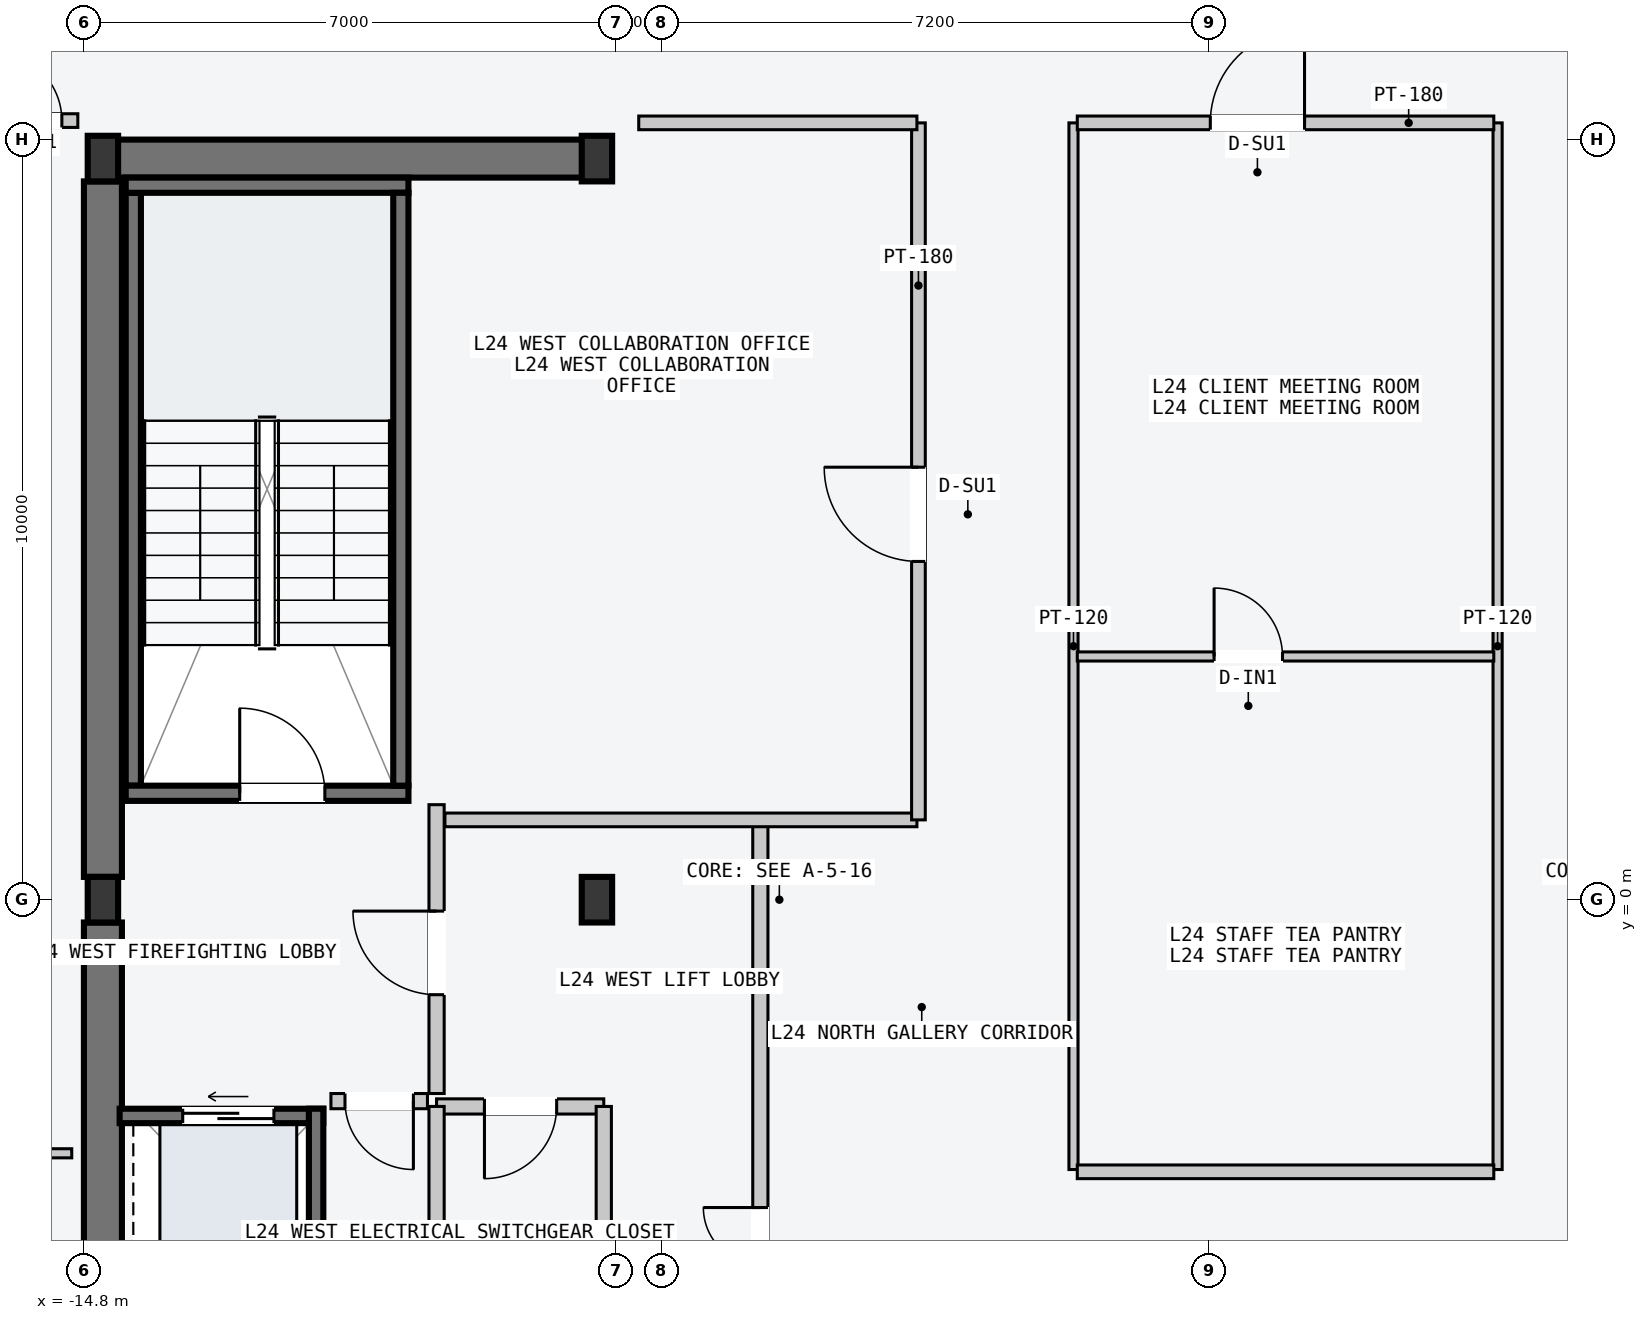
"""IFC4 building model, lengths in metres.
Left out: names, types, materials, properties, quantities, classifications, styles, units other than length and angle.
Written with IfcOpenShell. Run it as: python <this file> out.ifc"""

import sys

from ifc_helpers import new_model, si_unit, direction, frame, frame_2d, origin, origin_2d, place, context, subcontext, project, spatial, rectangle, i_section, extrude, element, fill, save


model = new_model("IFC4")
c1 = context("Model", 3, precision=1e-05, world=origin(), true_north=direction((0.0, 1.0)))
c2 = subcontext(c1, "Body", "Model", "MODEL_VIEW")
j1 = project(units=[si_unit("LENGTHUNIT", "METRE"), si_unit("PLANEANGLEUNIT", "RADIAN")], contexts=[c1])
p1 = place(None, origin())
s1 = spatial("IfcSite", under=j1, at=p1, CompositionType="ELEMENT")
p2 = place(p1, origin())
s2 = spatial("IfcBuilding", under=s1, at=p2, CompositionType="ELEMENT")
p3 = place(p2, frame((0.0, 0.0, 95.4)))
s3 = spatial("IfcBuildingStorey", under=s2, at=p3, CompositionType="ELEMENT", Elevation=95.4)
p4 = place(p3, frame((-14.53, 9.75, -0.2), z_axis=(0.0, 0.0, 1.0), x_axis=(1.0, 0.0, 0.0)))
e1 = element("IfcWall", 1, at=p4, inside=s3, PredefinedType="SHEAR", context=c2, shape_type="SweptSolid", body=[
    extrude(rectangle(XDim=6.46, YDim=0.5, at=frame_2d((3.23, 0.0))), origin(), (0.0, 0.0, 1.0), 3.6),
])
for number, where, z_axis, x_axis in (
    (2, (-14.55, -9.45, -0.2), (0.0, 0.0, 1.0), (0.0, 1.0, 0.0)),
    (3, (-14.55, 0.3, -0.2), (0.0, 0.0, 1.0), (0.0, 1.0, 0.0)),
):
    element("IfcWall", number, at=place(p3, frame(where, z_axis=z_axis, x_axis=x_axis)), inside=s3, PredefinedType="SHEAR", context=c2, shape_type="SweptSolid", body=[
        extrude(rectangle(XDim=9.15, YDim=0.5, at=frame_2d((4.575, 0.0))), origin(), (0.0, 0.0, 1.0), 3.6),
    ])
p5 = place(p3, frame((-14.15, 1.5, -0.2), z_axis=(0.0, 0.0, 1.0), x_axis=(0.0, 1.0, 0.0)))
e4 = element("IfcWall", 4, at=p5, inside=s3, PredefinedType="SOLIDWALL", context=c2, shape_type="SweptSolid", body=[
    extrude(rectangle(XDim=7.8, YDim=0.2, at=frame_2d((3.9, 0.0))), origin(), (0.0, 0.0, 1.0), 3.6),
])
p6 = place(p3, frame((-14.25, 1.4, -0.2), z_axis=(0.0, 0.0, 1.0), x_axis=(1.0, 0.0, 0.0)))
e5 = element("IfcWall", 5, at=p6, inside=s3, PredefinedType="SOLIDWALL", context=c2, shape_type="SweptSolid", body=[
    extrude(rectangle(XDim=3.72, YDim=0.2, at=frame_2d((1.86, 0.0))), origin(), (0.0, 0.0, 1.0), 3.6),
])
p7 = place(p6, frame((1.5, 0.0, 0.2)))
e6 = element("IfcOpeningElement", 6, at=p7, cuts=e5, PredefinedType="OPENING", context=c2, shape_type="SweptSolid", body=[
    extrude(rectangle(XDim=1.12, YDim=2.18, at=frame_2d((0.56, 1.09))), frame((0.0, 0.11, 0.0), z_axis=(0.0, -1.0, 0.0), x_axis=(1.0, 0.0, 0.0)), (0.0, 0.0, 1.0), 0.22),
])
p8 = place(p3, frame((-14.25, 9.4, -0.2), z_axis=(0.0, 0.0, 1.0), x_axis=(1.0, 0.0, 0.0)))
e7 = element("IfcWall", 7, at=p8, inside=s3, PredefinedType="SOLIDWALL", context=c2, shape_type="SweptSolid", body=[
    extrude(rectangle(XDim=3.72, YDim=0.2, at=frame_2d((1.86, 0.0))), origin(), (0.0, 0.0, 1.0), 3.6),
])
p9 = place(p3, frame((-10.63, 1.5, -0.2), z_axis=(0.0, 0.0, 1.0), x_axis=(0.0, 1.0, 0.0)))
e8 = element("IfcWall", 8, at=p9, inside=s3, PredefinedType="SOLIDWALL", context=c2, shape_type="SweptSolid", body=[
    extrude(rectangle(XDim=7.8, YDim=0.2, at=frame_2d((3.9, 0.0))), origin(), (0.0, 0.0, 1.0), 3.6),
])
for number, where, z_axis, x_axis in (
    (9, (-14.55, 0.0, 0.0), (0.0, 0.0, 1.0), (1.0, 0.0, 0.0)),
    (10, (-14.55, 9.75, 0.0), (0.0, 0.0, 1.0), (1.0, 0.0, 0.0)),
    (11, (-8.05, 0.0, 0.0), (0.0, 0.0, 1.0), (1.0, 0.0, 0.0)),
    (12, (-8.05, 9.75, 0.0), (0.0, 0.0, 1.0), (1.0, 0.0, 0.0)),
):
    element("IfcColumn", number, at=place(p3, frame(where, z_axis=z_axis, x_axis=x_axis)), inside=s3, PredefinedType="COLUMN", context=c2, shape_type="SweptSolid", body=[
        extrude(i_section(OverallWidth=0.4, OverallDepth=0.6, WebThickness=0.022, FlangeThickness=0.036, at=origin_2d()), origin(), (0.0, 0.0, 1.0), 3.6),
    ])
p10 = place(p3, frame((-14.33, -2.845, -0.2), z_axis=(0.0, 0.0, 1.0), x_axis=(1.0, 0.0, 0.0)))
e13 = element("IfcWall", 13, at=p10, inside=s3, PredefinedType="SOLIDWALL", context=c2, shape_type="SweptSolid", body=[
    extrude(rectangle(XDim=2.68, YDim=0.19, at=frame_2d((1.34, 0.0))), origin(), (0.0, 0.0, 1.0), 3.6),
])
p11 = place(p10, frame((0.83, 0.0, 0.2)))
e14 = element("IfcOpeningElement", 14, at=p11, cuts=e13, PredefinedType="OPENING", context=c2, shape_type="SweptSolid", body=[
    extrude(rectangle(XDim=1.2, YDim=2.2, at=frame_2d((0.6, 1.1))), frame((0.0, 0.105, 0.0), z_axis=(0.0, -1.0, 0.0), x_axis=(1.0, 0.0, 0.0)), (0.0, 0.0, 1.0), 0.21),
])
p12 = place(p3, frame((-11.745, -5.35, -0.2), z_axis=(0.0, 0.0, 1.0), x_axis=(0.0, 1.0, 0.0)))
e15 = element("IfcWall", 15, at=p12, inside=s3, PredefinedType="SOLIDWALL", context=c2, shape_type="SweptSolid", body=[
    extrude(rectangle(XDim=2.6, YDim=0.19, at=frame_2d((1.3, 0.0))), origin(), (0.0, 0.0, 1.0), 3.6),
])
p13 = place(p3, frame((-5.9, -9.45, 0.0), z_axis=(0.0, 0.0, 1.0), x_axis=(0.0, 1.0, 0.0)))
e16 = element("IfcWall", 16, at=p13, inside=s3, PredefinedType="PARTITIONING", context=c2, shape_type="SweptSolid", body=[
    extrude(rectangle(XDim=10.5, YDim=0.2, at=frame_2d((5.25, 0.0))), origin(), (0.0, 0.0, 1.0), 3.4),
])
p14 = place(p13, frame((3.9, 0.0, 0.0)))
e17 = element("IfcOpeningElement", 17, at=p14, cuts=e16, PredefinedType="OPENING", context=c2, shape_type="SweptSolid", body=[
    extrude(rectangle(XDim=1.5, YDim=2.2, at=frame_2d((0.75, 1.1))), frame((0.0, 0.11, 0.0), z_axis=(0.0, -1.0, 0.0), x_axis=(1.0, 0.0, 0.0)), (0.0, 0.0, 1.0), 0.22),
])
p15 = place(p3, frame((-10.16, -2.55, 0.0), z_axis=(0.0, 0.0, 1.0), x_axis=(0.0, 1.0, 0.0)))
e18 = element("IfcWall", 18, at=p15, inside=s3, PredefinedType="PARTITIONING", context=c2, shape_type="SweptSolid", body=[
    extrude(rectangle(XDim=3.8, YDim=0.2, at=frame_2d((1.9, 0.0))), origin(), (0.0, 0.0, 1.0), 3.4),
])
p16 = place(p15, frame((1.3, 0.0, 0.0)))
e19 = element("IfcOpeningElement", 19, at=p16, cuts=e18, PredefinedType="OPENING", context=c2, shape_type="SweptSolid", body=[
    extrude(rectangle(XDim=1.1, YDim=2.15, at=frame_2d((0.55, 1.075))), frame((0.0, 0.11, 0.0), z_axis=(0.0, -1.0, 0.0), x_axis=(1.0, 0.0, 0.0)), (0.0, 0.0, 1.0), 0.22),
])
p17 = place(p3, frame((-10.28, -2.65, 0.0), z_axis=(0.0, 0.0, 1.0), x_axis=(-1.0, 0.0, 0.0)))
e20 = element("IfcWall", 20, at=p17, inside=s3, PredefinedType="PARTITIONING", context=c2, shape_type="SweptSolid", body=[
    extrude(rectangle(XDim=1.27, YDim=0.2, at=frame_2d((0.635, 0.0))), origin(), (0.0, 0.0, 1.0), 3.4),
])
p18 = place(p17, frame((0.185, 0.0, 0.0)))
e21 = element("IfcOpeningElement", 21, at=p18, cuts=e20, PredefinedType="OPENING", context=c2, shape_type="SweptSolid", body=[
    extrude(rectangle(XDim=0.9, YDim=2.15, at=frame_2d((0.45, 1.075))), frame((0.0, 0.11, 0.0), z_axis=(0.0, -1.0, 0.0), x_axis=(1.0, 0.0, 0.0)), (0.0, 0.0, 1.0), 0.22),
])
p19 = place(p3, frame((-7.96, -2.72, 0.0), z_axis=(0.0, 0.0, 1.0), x_axis=(-1.0, 0.0, 0.0)))
e22 = element("IfcWall", 22, at=p19, inside=s3, PredefinedType="PARTITIONING", context=c2, shape_type="SweptSolid", body=[
    extrude(rectangle(XDim=2.2, YDim=0.2, at=frame_2d((1.1, 0.0))), origin(), (0.0, 0.0, 1.0), 3.4),
])
p20 = place(p19, frame((0.62, 0.0, 0.0)))
e23 = element("IfcOpeningElement", 23, at=p20, cuts=e22, PredefinedType="OPENING", context=c2, shape_type="SweptSolid", body=[
    extrude(rectangle(XDim=0.95, YDim=2.1, at=frame_2d((0.475, 1.05))), frame((0.0, 0.11, 0.0), z_axis=(0.0, -1.0, 0.0), x_axis=(1.0, 0.0, 0.0)), (0.0, 0.0, 1.0), 0.22),
])
for number, where, z_axis, x_axis in (
    (24, (-7.96, -5.16, 0.0), (0.0, 0.0, 1.0), (0.0, 1.0, 0.0)),
    (25, (-10.16, -5.16, 0.0), (0.0, 0.0, 1.0), (0.0, 1.0, 0.0)),
):
    element("IfcWall", number, at=place(p3, frame(where, z_axis=z_axis, x_axis=x_axis)), inside=s3, PredefinedType="PARTITIONING", context=c2, shape_type="SweptSolid", body=[
        extrude(rectangle(XDim=2.44, YDim=0.2, at=frame_2d((1.22, 0.0))), origin(), (0.0, 0.0, 1.0), 3.4),
    ])
p21 = place(p3, frame((-10.05, 1.05, 0.0), z_axis=(0.0, 0.0, 1.0), x_axis=(1.0, 0.0, 0.0)))
e26 = element("IfcWall", 26, at=p21, inside=s3, PredefinedType="PARTITIONING", context=c2, shape_type="SweptSolid", body=[
    extrude(rectangle(XDim=6.21, YDim=0.18, at=frame_2d((3.105, 0.0))), origin(), (0.0, 0.0, 1.0), 3.4),
])
p22 = place(p3, frame((-3.82, 1.05, 0.0), z_axis=(0.0, 0.0, 1.0), x_axis=(0.0, 1.0, 0.0)))
e27 = element("IfcWall", 27, at=p22, inside=s3, PredefinedType="PARTITIONING", context=c2, shape_type="SweptSolid", body=[
    extrude(rectangle(XDim=9.17, YDim=0.18, at=frame_2d((4.585, 0.0))), origin(), (0.0, 0.0, 1.0), 3.4),
])
p23 = place(p22, frame((3.4, 0.0, 0.0)))
e28 = element("IfcOpeningElement", 28, at=p23, cuts=e27, PredefinedType="OPENING", context=c2, shape_type="SweptSolid", body=[
    extrude(rectangle(XDim=1.24, YDim=2.24, at=frame_2d((0.62, 1.12))), frame((0.0, 0.1, 0.0), z_axis=(0.0, -1.0, 0.0), x_axis=(1.0, 0.0, 0.0)), (0.0, 0.0, 1.0), 0.2),
])
p24 = place(p3, frame((-7.5, 10.22, 0.0), z_axis=(0.0, 0.0, 1.0), x_axis=(1.0, 0.0, 0.0)))
e29 = element("IfcWall", 29, at=p24, inside=s3, PredefinedType="PARTITIONING", context=c2, shape_type="SweptSolid", body=[
    extrude(rectangle(XDim=3.66, YDim=0.18, at=frame_2d((1.83, 0.0))), origin(), (0.0, 0.0, 1.0), 3.4),
])
for number, where, z_axis, x_axis in (
    (30, (-1.78, -3.55, 0.0), (0.0, 0.0, 1.0), (0.0, 1.0, 0.0)),
    (31, (3.8, -3.55, 0.0), (0.0, 0.0, 1.0), (0.0, 1.0, 0.0)),
):
    element("IfcWall", number, at=place(p3, frame(where, z_axis=z_axis, x_axis=x_axis)), inside=s3, PredefinedType="PARTITIONING", context=c2, shape_type="SweptSolid", body=[
        extrude(rectangle(XDim=13.77, YDim=0.12, at=frame_2d((6.885, 0.0))), origin(), (0.0, 0.0, 1.0), 3.4),
    ])
p25 = place(p3, frame((-1.73, -3.58, 0.0), z_axis=(0.0, 0.0, 1.0), x_axis=(1.0, 0.0, 0.0)))
e32 = element("IfcWall", 32, at=p25, inside=s3, PredefinedType="PARTITIONING", context=c2, shape_type="SweptSolid", body=[
    extrude(rectangle(XDim=5.48, YDim=0.18, at=frame_2d((2.74, 0.0))), origin(), (0.0, 0.0, 1.0), 3.4),
])
p26 = place(p3, frame((-1.73, 3.2, 0.0), z_axis=(0.0, 0.0, 1.0), x_axis=(1.0, 0.0, 0.0)))
e33 = element("IfcWall", 33, at=p26, inside=s3, PredefinedType="PARTITIONING", context=c2, shape_type="SweptSolid", body=[
    extrude(rectangle(XDim=5.48, YDim=0.12, at=frame_2d((2.74, 0.0))), origin(), (0.0, 0.0, 1.0), 3.4),
])
p27 = place(p26, frame((1.8, 0.0, 0.0)))
e34 = element("IfcOpeningElement", 34, at=p27, cuts=e33, PredefinedType="OPENING", context=c2, shape_type="SweptSolid", body=[
    extrude(rectangle(XDim=0.9, YDim=2.15, at=frame_2d((0.45, 1.075))), frame((0.0, 0.07, 0.0), z_axis=(0.0, -1.0, 0.0), x_axis=(1.0, 0.0, 0.0)), (0.0, 0.0, 1.0), 0.14),
])
p28 = place(p3, frame((-1.73, 10.22, 0.0), z_axis=(0.0, 0.0, 1.0), x_axis=(1.0, 0.0, 0.0)))
e35 = element("IfcWall", 35, at=p28, inside=s3, PredefinedType="PARTITIONING", context=c2, shape_type="SweptSolid", body=[
    extrude(rectangle(XDim=5.48, YDim=0.18, at=frame_2d((2.74, 0.0))), origin(), (0.0, 0.0, 1.0), 3.4),
])
p29 = place(p28, frame((1.75, 0.0, 0.0)))
e36 = element("IfcOpeningElement", 36, at=p29, cuts=e35, PredefinedType="OPENING", context=c2, shape_type="SweptSolid", body=[
    extrude(rectangle(XDim=1.24, YDim=2.24, at=frame_2d((0.62, 1.12))), frame((0.0, 0.1, 0.0), z_axis=(0.0, -1.0, 0.0), x_axis=(1.0, 0.0, 0.0)), (0.0, 0.0, 1.0), 0.2),
])
p30 = place(p3, frame((-16.2, 10.25, 0.0), z_axis=(0.0, 0.0, 1.0), x_axis=(1.0, 0.0, 0.0)))
e37 = element("IfcWall", 37, at=p30, inside=s3, PredefinedType="PARTITIONING", context=c2, shape_type="SweptSolid", body=[
    extrude(rectangle(XDim=1.32, YDim=0.18, at=frame_2d((0.66, 0.0))), origin(), (0.0, 0.0, 1.0), 3.4),
])
p31 = place(p30, frame((0.21, 0.0, 0.0)))
e38 = element("IfcOpeningElement", 38, at=p31, cuts=e37, PredefinedType="OPENING", context=c2, shape_type="SweptSolid", body=[
    extrude(rectangle(XDim=0.9, YDim=2.15, at=frame_2d((0.45, 1.075))), frame((0.0, 0.1, 0.0), z_axis=(0.0, -1.0, 0.0), x_axis=(1.0, 0.0, 0.0)), (0.0, 0.0, 1.0), 0.2),
])
p32 = place(p3, frame((-22.56, -3.336, 0.0), z_axis=(0.0, 0.0, 1.0), x_axis=(1.0, 0.0, 0.0)))
e39 = element("IfcWall", 39, at=p32, inside=s3, PredefinedType="PARTITIONING", context=c2, shape_type="SweptSolid", body=[
    extrude(rectangle(XDim=7.6, YDim=0.12, at=frame_2d((3.8, 0.0))), origin(), (0.0, 0.0, 1.0), 3.0),
])
p33 = place(p32, frame((0.9, 0.0, 0.0)))
e40 = element("IfcOpeningElement", 40, at=p33, cuts=e39, PredefinedType="OPENING", context=c2, shape_type="SweptSolid", body=[
    extrude(rectangle(XDim=0.96, YDim=2.18, at=frame_2d((0.48, 1.09))), frame((0.0, 0.07, 0.0), z_axis=(0.0, -1.0, 0.0), x_axis=(1.0, 0.0, 0.0)), (0.0, 0.0, 1.0), 0.14),
])
p34 = place(p7, origin())
e41 = element("IfcDoor", 41, at=p34, inside=s3, OperationType="SINGLE_SWING_LEFT", PredefinedType="DOOR", context=c2, shape_type="SweptSolid", body=[
    extrude(rectangle(XDim=1.12, YDim=2.18, at=frame_2d((0.56, 1.09))), frame((0.0, 0.025, 0.0), z_axis=(0.0, -1.0, 0.0), x_axis=(1.0, 0.0, 0.0)), (0.0, 0.0, 1.0), 0.05),
])
fill(e6, e41)
p35 = place(p11, origin())
e42 = element("IfcDoor", 42, at=p35, inside=s3, OperationType="SLIDING_TO_LEFT", PredefinedType="DOOR", context=c2, shape_type="SweptSolid", body=[
    extrude(rectangle(XDim=1.2, YDim=2.2, at=frame_2d((0.6, 1.1))), frame((0.0, 0.025, 0.0), z_axis=(0.0, -1.0, 0.0), x_axis=(1.0, 0.0, 0.0)), (0.0, 0.0, 1.0), 0.05),
])
fill(e14, e42)
p36 = place(p14, origin())
e43 = element("IfcDoor", 43, at=p36, inside=s3, OperationType="DOUBLE_DOOR_SINGLE_SWING", PredefinedType="DOOR", context=c2, shape_type="SweptSolid", body=[
    extrude(rectangle(XDim=1.5, YDim=2.2, at=frame_2d((0.75, 1.1))), frame((0.0, 0.025, 0.0), z_axis=(0.0, -1.0, 0.0), x_axis=(1.0, 0.0, 0.0)), (0.0, 0.0, 1.0), 0.05),
])
fill(e17, e43)
p37 = place(p16, origin())
e44 = element("IfcDoor", 44, at=p37, inside=s3, OperationType="SINGLE_SWING_RIGHT", PredefinedType="DOOR", context=c2, shape_type="SweptSolid", body=[
    extrude(rectangle(XDim=1.1, YDim=2.15, at=frame_2d((0.55, 1.075))), frame((0.0, 0.025, 0.0), z_axis=(0.0, -1.0, 0.0), x_axis=(1.0, 0.0, 0.0)), (0.0, 0.0, 1.0), 0.05),
])
fill(e19, e44)
p38 = place(p18, origin())
e45 = element("IfcDoor", 45, at=p38, inside=s3, OperationType="SINGLE_SWING_LEFT", PredefinedType="DOOR", context=c2, shape_type="SweptSolid", body=[
    extrude(rectangle(XDim=0.9, YDim=2.15, at=frame_2d((0.45, 1.075))), frame((0.0, 0.025, 0.0), z_axis=(0.0, -1.0, 0.0), x_axis=(1.0, 0.0, 0.0)), (0.0, 0.0, 1.0), 0.05),
])
fill(e21, e45)
p39 = place(p20, origin())
e46 = element("IfcDoor", 46, at=p39, inside=s3, OperationType="SINGLE_SWING_RIGHT", PredefinedType="DOOR", context=c2, shape_type="SweptSolid", body=[
    extrude(rectangle(XDim=0.95, YDim=2.1, at=frame_2d((0.475, 1.05))), frame((0.0, 0.025, 0.0), z_axis=(0.0, -1.0, 0.0), x_axis=(1.0, 0.0, 0.0)), (0.0, 0.0, 1.0), 0.05),
])
fill(e23, e46)
p40 = place(p23, origin())
e47 = element("IfcDoor", 47, at=p40, inside=s3, OperationType="SINGLE_SWING_RIGHT", PredefinedType="DOOR", context=c2, shape_type="SweptSolid", body=[
    extrude(rectangle(XDim=1.24, YDim=2.24, at=frame_2d((0.62, 1.12))), frame((0.0, 0.025, 0.0), z_axis=(0.0, -1.0, 0.0), x_axis=(1.0, 0.0, 0.0)), (0.0, 0.0, 1.0), 0.05),
])
fill(e28, e47)
p41 = place(p27, origin())
e48 = element("IfcDoor", 48, at=p41, inside=s3, OperationType="SINGLE_SWING_LEFT", PredefinedType="DOOR", context=c2, shape_type="SweptSolid", body=[
    extrude(rectangle(XDim=0.9, YDim=2.15, at=frame_2d((0.45, 1.075))), frame((0.0, 0.025, 0.0), z_axis=(0.0, -1.0, 0.0), x_axis=(1.0, 0.0, 0.0)), (0.0, 0.0, 1.0), 0.05),
])
fill(e34, e48)
p42 = place(p29, origin())
e49 = element("IfcDoor", 49, at=p42, inside=s3, OperationType="SINGLE_SWING_RIGHT", PredefinedType="DOOR", context=c2, shape_type="SweptSolid", body=[
    extrude(rectangle(XDim=1.24, YDim=2.24, at=frame_2d((0.62, 1.12))), frame((0.0, 0.025, 0.0), z_axis=(0.0, -1.0, 0.0), x_axis=(1.0, 0.0, 0.0)), (0.0, 0.0, 1.0), 0.05),
])
fill(e36, e49)
p43 = place(p31, origin())
e50 = element("IfcDoor", 50, at=p43, inside=s3, OperationType="SINGLE_SWING_LEFT", PredefinedType="DOOR", context=c2, shape_type="SweptSolid", body=[
    extrude(rectangle(XDim=0.9, YDim=2.15, at=frame_2d((0.45, 1.075))), frame((0.0, 0.025, 0.0), z_axis=(0.0, -1.0, 0.0), x_axis=(1.0, 0.0, 0.0)), (0.0, 0.0, 1.0), 0.05),
])
fill(e38, e50)
save(model, sys.argv[1])
